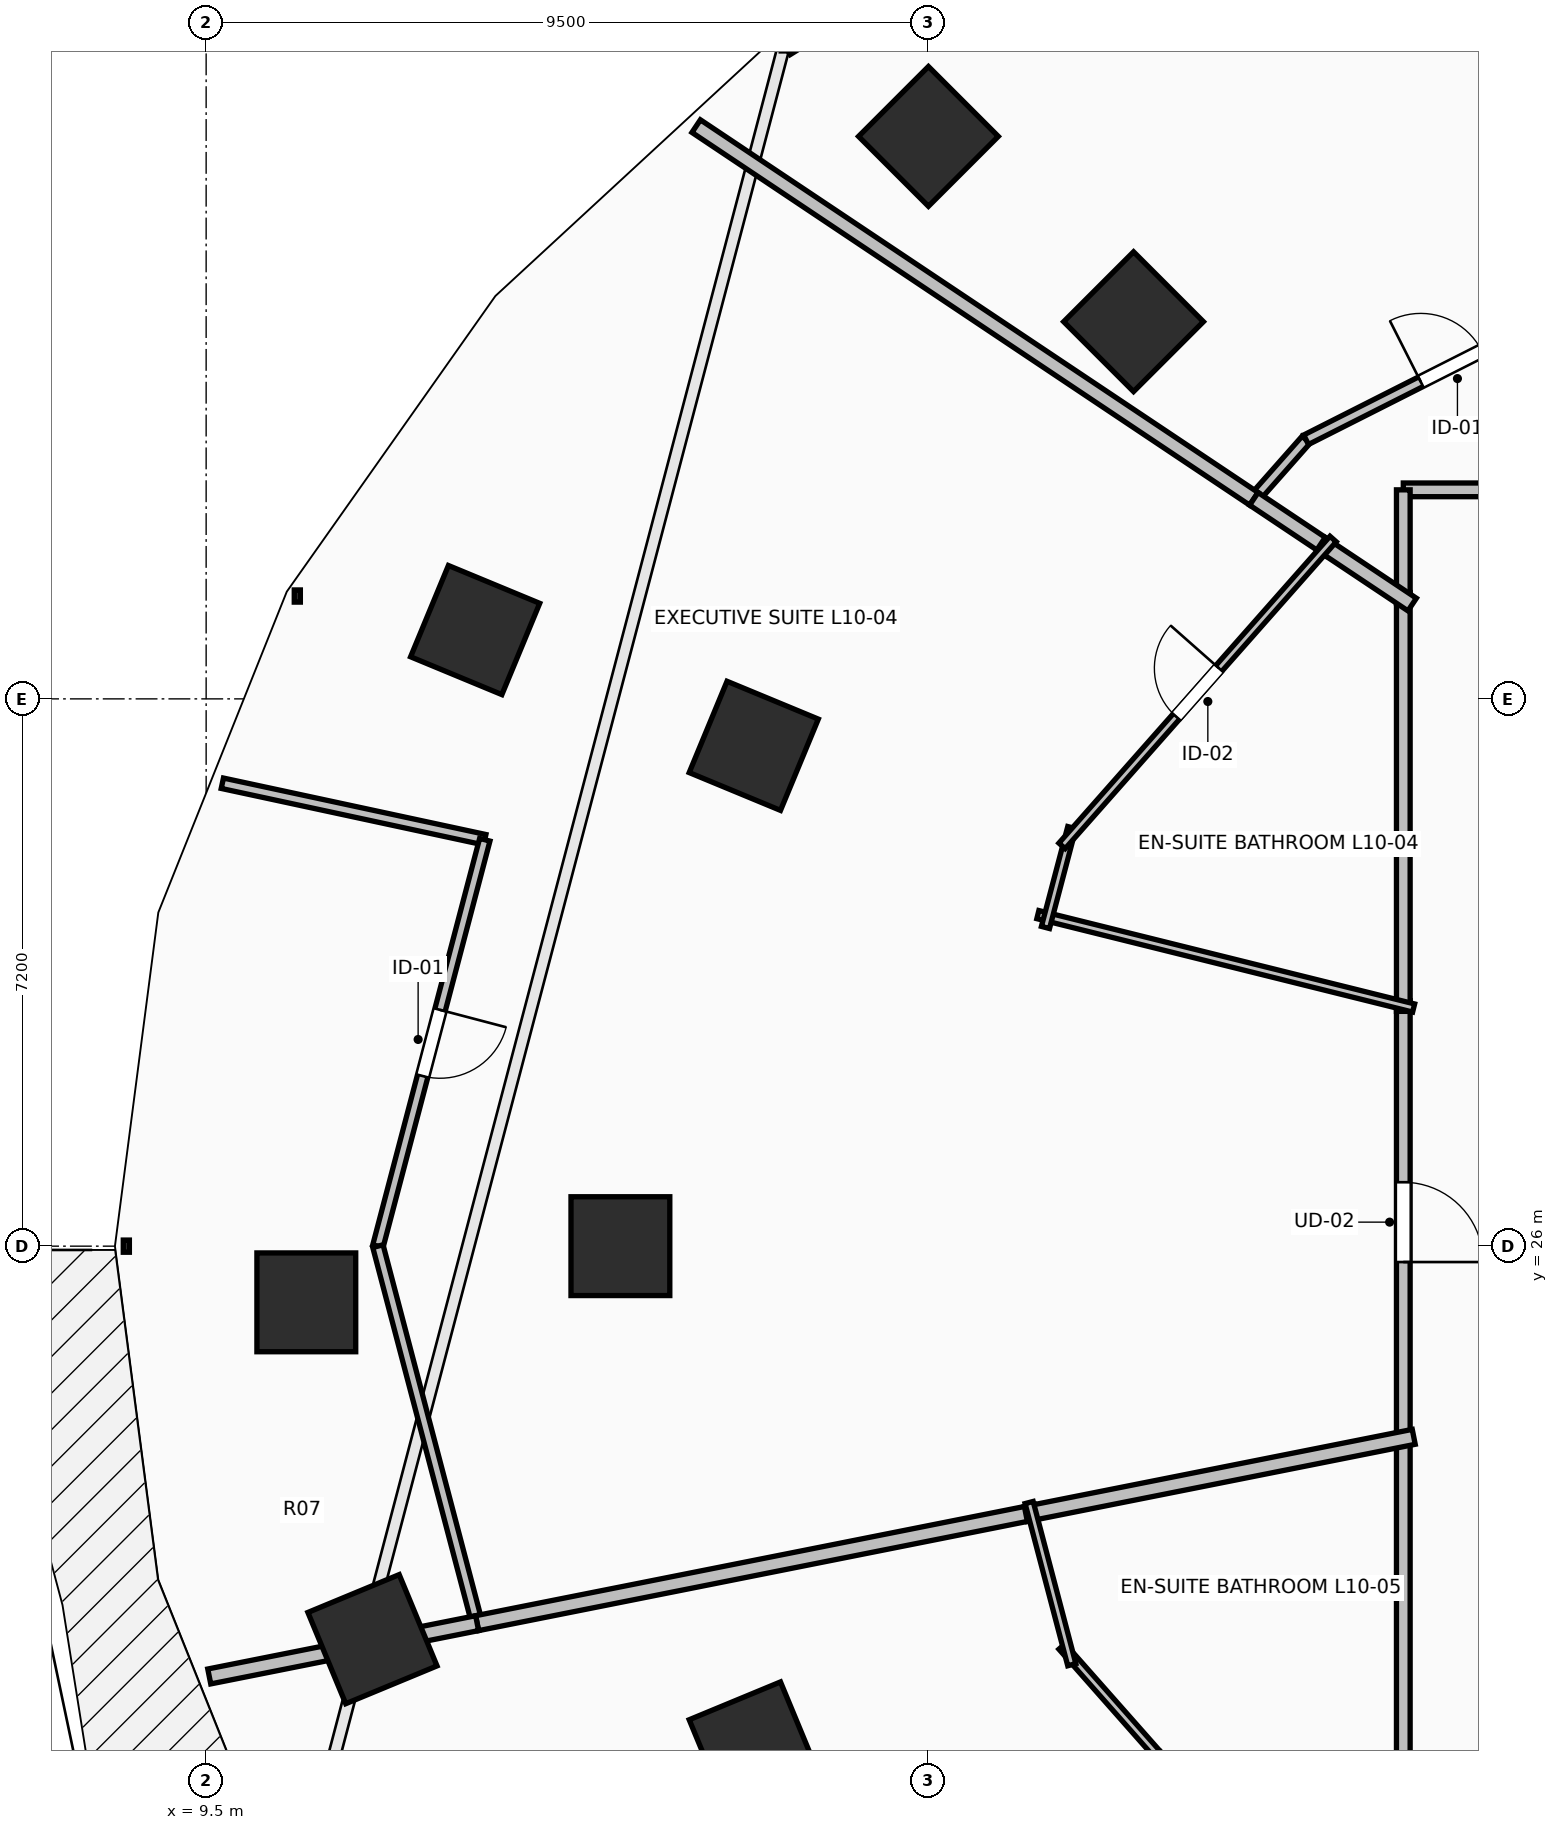
"""IFC4 building model, lengths in metres.
Left out: names, types, materials, properties, quantities, classifications, styles, units other than length and angle.
Written with IfcOpenShell. Run it as: python <this file> out.ifc"""

import sys

from ifc_helpers import new_model, si_unit, direction, frame, frame_2d, origin, origin_2d, place, context, subcontext, project, spatial, rectangle, extrude, element, fill, save


model = new_model("IFC4")
c1 = context("Model", 3, precision=1e-05, world=origin(), true_north=direction((0.0, 1.0)))
c2 = subcontext(c1, "Body", "Model", "MODEL_VIEW")
j1 = project(units=[si_unit("LENGTHUNIT", "METRE"), si_unit("PLANEANGLEUNIT", "RADIAN")], contexts=[c1])
p1 = place(None, origin())
s1 = spatial("IfcSite", under=j1, at=p1, CompositionType="ELEMENT")
p2 = place(p1, origin())
s2 = spatial("IfcBuilding", under=s1, at=p2, CompositionType="ELEMENT")
p3 = place(p2, frame((0.0, 0.0, 41.5)))
s3 = spatial("IfcBuildingStorey", under=s2, at=p3, CompositionType="ELEMENT", Elevation=41.5)
for number, where, z_axis, x_axis in (
    (1, (21.701, 38.162, 0.0), (0.0, 0.0, 1.0), (-0.707, 0.707, 0.0)),
    (2, (16.705, 32.582, 0.0), (0.0, 0.0, 1.0), (-0.924, 0.383, 0.0)),
    (3, (14.95, 26.0, 0.0), (0.0, 0.0, 1.0), (-1.0, 0.0, 0.0)),
    (4, (16.705, 19.418, 0.0), (0.0, 0.0, 1.0), (-0.924, -0.383, 0.0)),
    (5, (19.003, 40.6, 0.0), (0.0, 0.0, 1.0), (-0.707, 0.707, 0.0)),
    (6, (13.039, 34.105, 0.0), (0.0, 0.0, 1.0), (-0.924, 0.383, 0.0)),
    (7, (10.818, 25.261, 0.0), (0.0, 0.0, 1.0), (-1.0, 0.0, 0.0)),
    (8, (11.688, 20.83, 0.0), (0.0, 0.0, 1.0), (-0.924, -0.383, 0.0)),
):
    element("IfcColumn", number, at=place(p3, frame(where, z_axis=z_axis, x_axis=x_axis)), inside=s3, PredefinedType="COLUMN", context=c2, shape_type="SweptSolid", body=[
        extrude(rectangle(XDim=1.3, YDim=1.3, at=origin_2d()), origin(), (0.0, 0.0, 1.0), 3.5),
    ])
p4 = place(p3, frame((21.583, 44.583, 0.0), z_axis=(0.0, 0.0, 1.0), x_axis=(-0.849633724826, -0.527373239404, 0.0)))
e9 = element("IfcWall", 9, at=p4, inside=s3, PredefinedType="STANDARD", context=c2, shape_type="SweptSolid", body=[
    extrude(rectangle(XDim=5.271, YDim=0.3, at=frame_2d((2.635, 0.0))), origin(), (0.0, 0.0, 1.0), 3.24),
])
p5 = place(p4, frame((1.885, 0.0, 0.85)))
e10 = element("IfcOpeningElement", 10, at=p5, cuts=e9, PredefinedType="OPENING", context=c2, shape_type="SweptSolid", body=[
    extrude(rectangle(XDim=1.5, YDim=2.19, at=frame_2d((0.75, 1.095))), frame((0.0, 0.165, 0.0), z_axis=(0.0, -1.0, 0.0), x_axis=(1.0, 0.0, 0.0)), (0.0, 0.0, 1.0), 0.33),
])
p6 = place(p3, frame((29.822, 35.95, 0.0), z_axis=(0.0, 0.0, 1.0), x_axis=(-1.0, 0.0, 0.0)))
e11 = element("IfcWall", 11, at=p6, inside=s3, PredefinedType="PARTITIONING", context=c2, shape_type="SweptSolid", body=[
    extrude(rectangle(XDim=4.572, YDim=0.18, at=frame_2d((2.286, 0.0))), origin(), (0.0, 0.0, 1.0), 2.432),
])
p7 = place(p6, frame((1.786, 0.0, 0.0)))
e12 = element("IfcOpeningElement", 12, at=p7, cuts=e11, PredefinedType="OPENING", context=c2, shape_type="SweptSolid", body=[
    extrude(rectangle(XDim=1.0, YDim=2.15, at=frame_2d((0.5, 1.075))), frame((0.0, 0.105, 0.0), z_axis=(0.0, -1.0, 0.0), x_axis=(1.0, 0.0, 0.0)), (0.0, 0.0, 1.0), 0.21),
])
p8 = place(p3, frame((25.25, 35.95, 0.0), z_axis=(0.0, 0.0, 1.0), x_axis=(0.0, -1.0, 0.0)))
e13 = element("IfcWall", 13, at=p8, inside=s3, PredefinedType="PARTITIONING", context=c2, shape_type="SweptSolid", body=[
    extrude(rectangle(XDim=1.491, YDim=0.18, at=frame_2d((0.746, 0.0))), origin(), (0.0, 0.0, 1.0), 2.432),
])
p9 = place(p3, frame((25.25, 29.229, 0.0), z_axis=(0.0, 0.0, 1.0), x_axis=(0.0, -1.0, 0.0)))
e14 = element("IfcWall", 14, at=p9, inside=s3, PredefinedType="PARTITIONING", context=c2, shape_type="SweptSolid", body=[
    extrude(rectangle(XDim=5.826, YDim=0.18, at=frame_2d((2.913, 0.0))), origin(), (0.0, 0.0, 1.0), 2.432),
])
p10 = place(p9, frame((2.388, 0.0, 0.0)))
e15 = element("IfcOpeningElement", 15, at=p10, cuts=e14, PredefinedType="OPENING", context=c2, shape_type="SweptSolid", body=[
    extrude(rectangle(XDim=1.05, YDim=2.2, at=frame_2d((0.525, 1.1))), frame((0.0, 0.105, 0.0), z_axis=(0.0, -1.0, 0.0), x_axis=(1.0, 0.0, 0.0)), (0.0, 0.0, 1.0), 0.21),
])
p11 = place(p3, frame((25.25, 34.599, 0.0), z_axis=(0.0, 0.0, 1.0), x_axis=(0.0, -1.0, 0.0)))
e16 = element("IfcWall", 16, at=p11, inside=s3, PredefinedType="PARTITIONING", context=c2, shape_type="SweptSolid", body=[
    extrude(rectangle(XDim=5.51, YDim=0.18, at=frame_2d((2.755, 0.0))), origin(), (0.0, 0.0, 1.0), 2.432),
])
p12 = place(p3, frame((25.25, 23.543, 0.0), z_axis=(0.0, 0.0, 1.0), x_axis=(0.0, -1.0, 0.0)))
e17 = element("IfcWall", 17, at=p12, inside=s3, PredefinedType="PARTITIONING", context=c2, shape_type="SweptSolid", body=[
    extrude(rectangle(XDim=5.299, YDim=0.18, at=frame_2d((2.649, 0.0))), origin(), (0.0, 0.0, 1.0), 3.24),
])
p13 = place(p3, frame((23.284, 35.832, 0.0), z_axis=(0.0, 0.0, 1.0), x_axis=(0.662462125237, 0.749095409561, 0.0)))
e18 = element("IfcWall", 18, at=p13, inside=s3, PredefinedType="PARTITIONING", context=c2, shape_type="SweptSolid", body=[
    extrude(rectangle(XDim=1.037, YDim=0.14, at=frame_2d((0.519, 0.0))), origin(), (0.0, 0.0, 1.0), 2.432),
])
p14 = place(p3, frame((23.971, 36.609, 0.0), z_axis=(0.0, 0.0, 1.0), x_axis=(0.892445030909, 0.451156144596, 0.0)))
e19 = element("IfcWall", 19, at=p14, inside=s3, PredefinedType="PARTITIONING", context=c2, shape_type="SweptSolid", body=[
    extrude(rectangle(XDim=4.281, YDim=0.14, at=frame_2d((2.14, 0.0))), origin(), (0.0, 0.0, 1.0), 3.24),
])
p15 = place(p14, frame((1.69, 0.0, 0.0)))
e20 = element("IfcOpeningElement", 20, at=p15, cuts=e19, PredefinedType="OPENING", context=c2, shape_type="SweptSolid", body=[
    extrude(rectangle(XDim=0.9, YDim=2.1, at=frame_2d((0.45, 1.05))), frame((0.0, 0.085, 0.0), z_axis=(0.0, -1.0, 0.0), x_axis=(1.0, 0.0, 0.0)), (0.0, 0.0, 1.0), 0.17),
])
p16 = place(p3, frame((15.947, 40.735, 0.0), z_axis=(0.0, 0.0, 1.0), x_axis=(0.831432604336, -0.555625615363, 0.0)))
e21 = element("IfcWall", 21, at=p16, inside=s3, PredefinedType="PARTITIONING", context=c2, shape_type="SweptSolid", body=[
    extrude(rectangle(XDim=8.824, YDim=0.2, at=frame_2d((4.412, 0.0))), origin(), (0.0, 0.0, 1.0), 2.624),
])
p17 = place(p3, frame((23.284, 35.832, 0.0), z_axis=(0.0, 0.0, 1.0), x_axis=(0.831550226979, -0.555449565677, 0.0)))
e22 = element("IfcWall", 22, at=p17, inside=s3, PredefinedType="PARTITIONING", context=c2, shape_type="SweptSolid", body=[
    extrude(rectangle(XDim=1.203, YDim=0.2, at=frame_2d((0.601, 0.0))), origin(), (0.0, 0.0, 1.0), 2.972),
])
p18 = place(p3, frame((24.167, 35.241, 0.0), z_axis=(0.0, 0.0, 1.0), x_axis=(0.831815696492, -0.555051931868, 0.0)))
e23 = element("IfcWall", 23, at=p18, inside=s3, PredefinedType="PARTITIONING", context=c2, shape_type="SweptSolid", body=[
    extrude(rectangle(XDim=1.441, YDim=0.2, at=frame_2d((0.721, 0.0))), origin(), (0.0, 0.0, 1.0), 2.972),
])
p19 = place(p3, frame((25.386, 29.133, 0.0), z_axis=(0.0, 0.0, 1.0), x_axis=(-0.970485458541, 0.241159645796, 0.0)))
e24 = element("IfcWall", 24, at=p19, inside=s3, PredefinedType="PARTITIONING", context=c2, shape_type="SweptSolid", body=[
    extrude(rectangle(XDim=5.094, YDim=0.11, at=frame_2d((2.547, 0.0))), origin(), (0.0, 0.0, 1.0), 2.432),
])
p20 = place(p3, frame((20.542, 30.193, 0.0), z_axis=(0.0, 0.0, 1.0), x_axis=(0.254988593673, 0.966944060997, 0.0)))
e25 = element("IfcWall", 25, at=p20, inside=s3, PredefinedType="PARTITIONING", context=c2, shape_type="SweptSolid", body=[
    extrude(rectangle(XDim=1.359, YDim=0.11, at=frame_2d((0.679, 0.0))), origin(), (0.0, 0.0, 1.0), 2.432),
])
p21 = place(p3, frame((20.76, 31.266, 0.0), z_axis=(0.0, 0.0, 1.0), x_axis=(0.662087707802, 0.749426358742, 0.0)))
e26 = element("IfcWall", 26, at=p21, inside=s3, PredefinedType="PARTITIONING", context=c2, shape_type="SweptSolid", body=[
    extrude(rectangle(XDim=5.387, YDim=0.11, at=frame_2d((2.693, 0.0))), origin(), (0.0, 0.0, 1.0), 2.972),
])
p22 = place(p21, frame((2.268, 0.0, 0.0)))
e27 = element("IfcOpeningElement", 27, at=p22, cuts=e26, PredefinedType="OPENING", context=c2, shape_type="SweptSolid", body=[
    extrude(rectangle(XDim=0.85, YDim=2.1, at=frame_2d((0.425, 1.05))), frame((0.0, 0.07, 0.0), z_axis=(0.0, -1.0, 0.0), x_axis=(1.0, 0.0, 0.0)), (0.0, 0.0, 1.0), 0.14),
])
p23 = place(p3, frame((9.713, 32.09, 0.0), z_axis=(0.0, 0.0, 1.0), x_axis=(0.977615913399, -0.210397542448, 0.0)))
e28 = element("IfcWall", 28, at=p23, inside=s3, PredefinedType="PARTITIONING", context=c2, shape_type="SweptSolid", body=[
    extrude(rectangle(XDim=3.532, YDim=0.14, at=frame_2d((1.766, 0.0))), origin(), (0.0, 0.0, 1.0), 2.624),
])
p24 = place(p3, frame((13.166, 31.347, 0.0), z_axis=(0.0, 0.0, 1.0), x_axis=(-0.25431071056, -0.967122568496, 0.0)))
e29 = element("IfcWall", 29, at=p24, inside=s3, PredefinedType="PARTITIONING", context=c2, shape_type="SweptSolid", body=[
    extrude(rectangle(XDim=5.529, YDim=0.14, at=frame_2d((2.764, 0.0))), origin(), (0.0, 0.0, 1.0), 3.24),
])
p25 = place(p24, frame((2.314, 0.0, 0.0)))
e30 = element("IfcOpeningElement", 30, at=p25, cuts=e29, PredefinedType="OPENING", context=c2, shape_type="SweptSolid", body=[
    extrude(rectangle(XDim=0.9, YDim=2.1, at=frame_2d((0.45, 1.05))), frame((0.0, 0.085, 0.0), z_axis=(0.0, -1.0, 0.0), x_axis=(1.0, 0.0, 0.0)), (0.0, 0.0, 1.0), 0.17),
])
p26 = place(p3, frame((11.76, 26.0, 0.0), z_axis=(0.0, 0.0, 1.0), x_axis=(0.254434720755, -0.967089950767, 0.0)))
e31 = element("IfcWall", 31, at=p26, inside=s3, PredefinedType="PARTITIONING", context=c2, shape_type="SweptSolid", body=[
    extrude(rectangle(XDim=5.129, YDim=0.14, at=frame_2d((2.564, 0.0))), origin(), (0.0, 0.0, 1.0), 2.432),
])
p27 = place(p3, frame((13.065, 21.04, 0.0), z_axis=(0.0, 0.0, 1.0), x_axis=(0.980774220135, 0.195145917502, 0.0)))
e32 = element("IfcWall", 32, at=p27, inside=s3, PredefinedType="PARTITIONING", context=c2, shape_type="SweptSolid", body=[
    extrude(rectangle(XDim=7.501, YDim=0.2, at=frame_2d((3.751, 0.0))), origin(), (0.0, 0.0, 1.0), 2.922),
])
p28 = place(p3, frame((20.285, 22.476, 0.0), z_axis=(0.0, 0.0, 1.0), x_axis=(0.980785905074, 0.195087181559, 0.0)))
e33 = element("IfcWall", 33, at=p28, inside=s3, PredefinedType="PARTITIONING", context=c2, shape_type="SweptSolid", body=[
    extrude(rectangle(XDim=5.202, YDim=0.2, at=frame_2d((2.601, 0.0))), origin(), (0.0, 0.0, 1.0), 2.972),
])
p29 = place(p3, frame((9.541, 20.339, 0.0), z_axis=(0.0, 0.0, 1.0), x_axis=(0.980786594985, 0.195083713053, 0.0)))
e34 = element("IfcWall", 34, at=p29, inside=s3, PredefinedType="PARTITIONING", context=c2, shape_type="SweptSolid", body=[
    extrude(rectangle(XDim=3.593, YDim=0.2, at=frame_2d((1.796, 0.0))), origin(), (0.0, 0.0, 1.0), 2.432),
])
p30 = place(p3, frame((23.802, 17.291, 0.0), z_axis=(0.0, 0.0, 1.0), x_axis=(-0.662071486681, 0.74944068913, 0.0)))
e35 = element("IfcWall", 35, at=p30, inside=s3, PredefinedType="PARTITIONING", context=c2, shape_type="SweptSolid", body=[
    extrude(rectangle(XDim=4.594, YDim=0.11, at=frame_2d((2.297, 0.0))), origin(), (0.0, 0.0, 1.0), 2.432),
])
p31 = place(p30, frame((1.872, 0.0, 0.0)))
e36 = element("IfcOpeningElement", 36, at=p31, cuts=e35, PredefinedType="OPENING", context=c2, shape_type="SweptSolid", body=[
    extrude(rectangle(XDim=0.85, YDim=2.1, at=frame_2d((0.425, 1.05))), frame((0.0, 0.07, 0.0), z_axis=(0.0, -1.0, 0.0), x_axis=(1.0, 0.0, 0.0)), (0.0, 0.0, 1.0), 0.14),
])
p32 = place(p3, frame((20.889, 20.494, 0.0), z_axis=(0.0, 0.0, 1.0), x_axis=(-0.254389812051, 0.967101764823, 0.0)))
e37 = element("IfcWall", 37, at=p32, inside=s3, PredefinedType="PARTITIONING", context=c2, shape_type="SweptSolid", body=[
    extrude(rectangle(XDim=2.206, YDim=0.11, at=frame_2d((1.103, 0.0))), origin(), (0.0, 0.0, 1.0), 3.24),
])
p33 = place(p10, origin())
e38 = element("IfcDoor", 38, at=p33, inside=s3, OperationType="SINGLE_SWING_RIGHT", PredefinedType="DOOR", context=c2, shape_type="SweptSolid", body=[
    extrude(rectangle(XDim=1.05, YDim=2.2, at=frame_2d((0.525, 1.1))), frame((0.0, 0.025, 0.0), z_axis=(0.0, -1.0, 0.0), x_axis=(1.0, 0.0, 0.0)), (0.0, 0.0, 1.0), 0.05),
])
fill(e15, e38)
p34 = place(p15, origin())
e39 = element("IfcDoor", 39, at=p34, inside=s3, OperationType="SINGLE_SWING_LEFT", PredefinedType="DOOR", context=c2, shape_type="SweptSolid", body=[
    extrude(rectangle(XDim=0.9, YDim=2.1, at=frame_2d((0.45, 1.05))), frame((0.0, 0.025, 0.0), z_axis=(0.0, -1.0, 0.0), x_axis=(1.0, 0.0, 0.0)), (0.0, 0.0, 1.0), 0.05),
])
fill(e20, e39)
p35 = place(p22, origin())
e40 = element("IfcDoor", 40, at=p35, inside=s3, OperationType="SINGLE_SWING_RIGHT", PredefinedType="DOOR", context=c2, shape_type="SweptSolid", body=[
    extrude(rectangle(XDim=0.85, YDim=2.1, at=frame_2d((0.425, 1.05))), frame((0.0, 0.025, 0.0), z_axis=(0.0, -1.0, 0.0), x_axis=(1.0, 0.0, 0.0)), (0.0, 0.0, 1.0), 0.05),
])
fill(e27, e40)
p36 = place(p25, origin())
e41 = element("IfcDoor", 41, at=p36, inside=s3, OperationType="SINGLE_SWING_LEFT", PredefinedType="DOOR", context=c2, shape_type="SweptSolid", body=[
    extrude(rectangle(XDim=0.9, YDim=2.1, at=frame_2d((0.45, 1.05))), frame((0.0, 0.025, 0.0), z_axis=(0.0, -1.0, 0.0), x_axis=(1.0, 0.0, 0.0)), (0.0, 0.0, 1.0), 0.05),
])
fill(e30, e41)
save(model, sys.argv[1])
